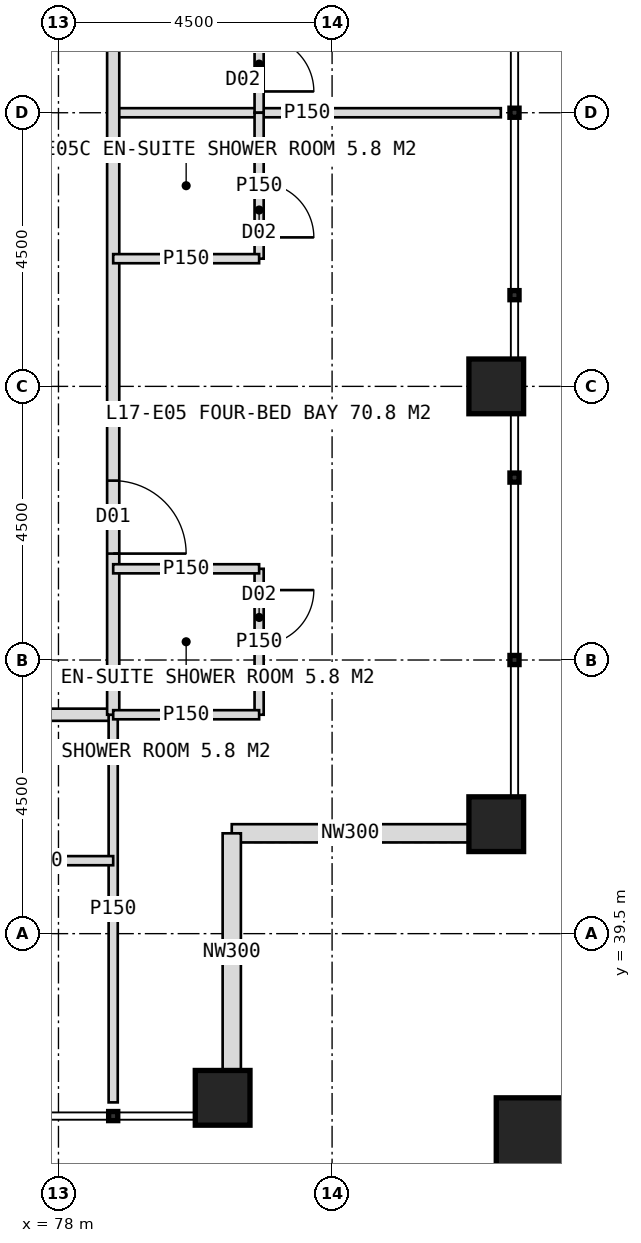
"""IFC4 building model, lengths in metres.
Left out: names, types, materials, properties, quantities, classifications, styles, units other than length and angle.
Written with IfcOpenShell. Run it as: python <this file> out.ifc"""

import sys

from ifc_helpers import new_model, si_unit, direction, frame, frame_2d, origin, origin_2d, place, context, subcontext, project, spatial, rectangle, hollow_rectangle, extrude, element, fill, save


model = new_model("IFC4")
c1 = context("Model", 3, precision=1e-05, world=origin(), true_north=direction((0.0, 1.0)))
c2 = subcontext(c1, "Body", "Model", "MODEL_VIEW")
j1 = project(units=[si_unit("LENGTHUNIT", "METRE"), si_unit("PLANEANGLEUNIT", "RADIAN")], contexts=[c1])
p1 = place(None, origin())
s1 = spatial("IfcSite", under=j1, at=p1, CompositionType="ELEMENT")
p2 = place(p1, origin())
s2 = spatial("IfcBuilding", under=s1, at=p2, CompositionType="ELEMENT")
p3 = place(p2, frame((0.0, 0.0, 75.0)))
s3 = spatial("IfcBuildingStorey", under=s2, at=p3, CompositionType="ELEMENT", Elevation=75.0)
for number, where, z_axis, x_axis in (
    (1, (85.2, 41.3, 0.0), (0.0, 0.0, 1.0), (1.0, 0.0, 0.0)),
    (2, (85.2, 48.5, 0.0), (0.0, 0.0, 1.0), (1.0, 0.0, 0.0)),
    (3, (80.7, 36.8, 0.0), (0.0, 0.0, 1.0), (1.0, 0.0, 0.0)),
):
    element("IfcColumn", number, at=place(p3, frame(where, z_axis=z_axis, x_axis=x_axis)), inside=s3, PredefinedType="COLUMN", context=c2, shape_type="SweptSolid", body=[
        extrude(hollow_rectangle(XDim=0.9, YDim=0.9, WallThickness=0.08, at=origin_2d()), origin(), (0.0, 0.0, 1.0), 4.0),
    ])
p4 = place(p3, frame((86.1, 35.9, 0.0), z_axis=(0.0, 0.0, 1.0), x_axis=(1.0, 0.0, 0.0)))
e4 = element("IfcColumn", 4, at=p4, inside=s3, PredefinedType="COLUMN", context=c2, shape_type="SweptSolid", body=[
    extrude(hollow_rectangle(XDim=1.8, YDim=1.8, WallThickness=0.1, at=origin_2d()), origin(), (0.0, 0.0, 1.0), 4.0),
])
for number, where, z_axis, x_axis in (
    (5, (84.75, 41.15, 0.0), (0.0, 0.0, 1.0), (-1.0, 0.0, 0.0)),
    (6, (80.85, 41.15, 0.0), (0.0, 0.0, 1.0), (0.0, -1.0, 0.0)),
):
    element("IfcWall", number, at=place(p3, frame(where, z_axis=z_axis, x_axis=x_axis)), inside=s3, PredefinedType="ELEMENTEDWALL", context=c2, shape_type="SweptSolid", body=[
        extrude(rectangle(XDim=3.9, YDim=0.3, at=frame_2d((1.95, 0.0))), origin(), (0.0, 0.0, 1.0), 2.95),
    ])
p5 = place(p3, frame((78.9, 43.1, 0.0), z_axis=(0.0, 0.0, 1.0), x_axis=(-1.0, 0.0, 0.0)))
e7 = element("IfcWall", 7, at=p5, inside=s3, PredefinedType="PARTITIONING", context=c2, shape_type="SweptSolid", body=[
    extrude(rectangle(XDim=37.8, YDim=0.2, at=frame_2d((18.9, 0.0))), origin(), (0.0, 0.0, 1.0), 3.75),
])
p6 = place(p5, frame((6.05, 0.0, 0.0)))
e8 = element("IfcOpeningElement", 8, at=p6, cuts=e7, PredefinedType="OPENING", context=c2, shape_type="SweptSolid", body=[
    extrude(rectangle(XDim=1.2, YDim=2.2, at=frame_2d((0.6, 1.1))), frame((0.0, 0.11, 0.0), z_axis=(0.0, -1.0, 0.0), x_axis=(1.0, 0.0, 0.0)), (0.0, 0.0, 1.0), 0.22),
])
p7 = place(p5, frame((12.55, 0.0, 0.0)))
e9 = element("IfcOpeningElement", 9, at=p7, cuts=e7, PredefinedType="OPENING", context=c2, shape_type="SweptSolid", body=[
    extrude(rectangle(XDim=1.2, YDim=2.2, at=frame_2d((0.6, 1.1))), frame((0.0, 0.11, 0.0), z_axis=(0.0, -1.0, 0.0), x_axis=(1.0, 0.0, 0.0)), (0.0, 0.0, 1.0), 0.22),
])
p8 = place(p5, frame((21.05, 0.0, 0.0)))
e10 = element("IfcOpeningElement", 10, at=p8, cuts=e7, PredefinedType="OPENING", context=c2, shape_type="SweptSolid", body=[
    extrude(rectangle(XDim=1.2, YDim=2.2, at=frame_2d((0.6, 1.1))), frame((0.0, 0.11, 0.0), z_axis=(0.0, -1.0, 0.0), x_axis=(1.0, 0.0, 0.0)), (0.0, 0.0, 1.0), 0.22),
])
p9 = place(p5, frame((27.55, 0.0, 0.0)))
e11 = element("IfcOpeningElement", 11, at=p9, cuts=e7, PredefinedType="OPENING", context=c2, shape_type="SweptSolid", body=[
    extrude(rectangle(XDim=1.2, YDim=2.2, at=frame_2d((0.6, 1.1))), frame((0.0, 0.11, 0.0), z_axis=(0.0, -1.0, 0.0), x_axis=(1.0, 0.0, 0.0)), (0.0, 0.0, 1.0), 0.22),
])
p10 = place(p3, frame((78.9, 43.1, 0.0), z_axis=(0.0, 0.0, 1.0), x_axis=(0.0, -1.0, 0.0)))
e12 = element("IfcWall", 12, at=p10, inside=s3, PredefinedType="PARTITIONING", context=c2, shape_type="SweptSolid", body=[
    extrude(rectangle(XDim=6.375, YDim=0.15, at=frame_2d((3.188, 0.0))), origin(), (0.0, 0.0, 1.0), 3.75),
])
p11 = place(p3, frame((78.9, 40.7, 0.0), z_axis=(0.0, 0.0, 1.0), x_axis=(-1.0, 0.0, 0.0)))
e13 = element("IfcWall", 13, at=p11, inside=s3, PredefinedType="PARTITIONING", context=c2, shape_type="SweptSolid", body=[
    extrude(rectangle(XDim=2.4, YDim=0.15, at=frame_2d((1.2, 0.0))), origin(), (0.0, 0.0, 1.0), 3.75),
])
p12 = place(p11, frame((1.15, 0.0, 0.0)))
e14 = element("IfcOpeningElement", 14, at=p12, cuts=e13, PredefinedType="OPENING", context=c2, shape_type="SweptSolid", body=[
    extrude(rectangle(XDim=0.9, YDim=2.1, at=frame_2d((0.45, 1.05))), frame((0.0, 0.085, 0.0), z_axis=(0.0, -1.0, 0.0), x_axis=(1.0, 0.0, 0.0)), (0.0, 0.0, 1.0), 0.17),
])
p13 = place(p3, frame((78.9, 53.0, 0.0), z_axis=(0.0, 0.0, 1.0), x_axis=(1.0, 0.0, 0.0)))
e15 = element("IfcWall", 15, at=p13, inside=s3, PredefinedType="PARTITIONING", context=c2, shape_type="SweptSolid", body=[
    extrude(rectangle(XDim=6.375, YDim=0.15, at=frame_2d((3.188, 0.0))), origin(), (0.0, 0.0, 1.0), 3.75),
])
p14 = place(p3, frame((78.9, 80.9, 0.0), z_axis=(0.0, 0.0, 1.0), x_axis=(0.0, -1.0, 0.0)))
e16 = element("IfcWall", 16, at=p14, inside=s3, PredefinedType="PARTITIONING", context=c2, shape_type="SweptSolid", body=[
    extrude(rectangle(XDim=37.8, YDim=0.2, at=frame_2d((18.9, 0.0))), origin(), (0.0, 0.0, 1.0), 3.75),
])
p15 = place(p14, frame((2.45, 0.0, 0.0)))
e17 = element("IfcOpeningElement", 17, at=p15, cuts=e16, PredefinedType="OPENING", context=c2, shape_type="SweptSolid", body=[
    extrude(rectangle(XDim=1.2, YDim=2.2, at=frame_2d((0.6, 1.1))), frame((0.0, 0.11, 0.0), z_axis=(0.0, -1.0, 0.0), x_axis=(1.0, 0.0, 0.0)), (0.0, 0.0, 1.0), 0.22),
])
p16 = place(p14, frame((9.55, 0.0, 0.0)))
e18 = element("IfcOpeningElement", 18, at=p16, cuts=e16, PredefinedType="OPENING", context=c2, shape_type="SweptSolid", body=[
    extrude(rectangle(XDim=1.2, YDim=2.2, at=frame_2d((0.6, 1.1))), frame((0.0, 0.11, 0.0), z_axis=(0.0, -1.0, 0.0), x_axis=(1.0, 0.0, 0.0)), (0.0, 0.0, 1.0), 0.22),
])
p17 = place(p14, frame((15.05, 0.0, 0.0)))
e19 = element("IfcOpeningElement", 19, at=p17, cuts=e16, PredefinedType="OPENING", context=c2, shape_type="SweptSolid", body=[
    extrude(rectangle(XDim=1.2, YDim=2.2, at=frame_2d((0.6, 1.1))), frame((0.0, 0.11, 0.0), z_axis=(0.0, -1.0, 0.0), x_axis=(1.0, 0.0, 0.0)), (0.0, 0.0, 1.0), 0.22),
])
p18 = place(p14, frame((21.55, 0.0, 0.0)))
e20 = element("IfcOpeningElement", 20, at=p18, cuts=e16, PredefinedType="OPENING", context=c2, shape_type="SweptSolid", body=[
    extrude(rectangle(XDim=1.2, YDim=2.2, at=frame_2d((0.6, 1.1))), frame((0.0, 0.11, 0.0), z_axis=(0.0, -1.0, 0.0), x_axis=(1.0, 0.0, 0.0)), (0.0, 0.0, 1.0), 0.22),
])
p19 = place(p14, frame((33.95, 0.0, 0.0)))
e21 = element("IfcOpeningElement", 21, at=p19, cuts=e16, PredefinedType="OPENING", context=c2, shape_type="SweptSolid", body=[
    extrude(rectangle(XDim=1.2, YDim=2.2, at=frame_2d((0.6, 1.1))), frame((0.0, 0.11, 0.0), z_axis=(0.0, -1.0, 0.0), x_axis=(1.0, 0.0, 0.0)), (0.0, 0.0, 1.0), 0.22),
])
p20 = place(p3, frame((81.3, 55.4, 0.0), z_axis=(0.0, 0.0, 1.0), x_axis=(0.0, -1.0, 0.0)))
e22 = element("IfcWall", 22, at=p20, inside=s3, PredefinedType="PARTITIONING", context=c2, shape_type="SweptSolid", body=[
    extrude(rectangle(XDim=2.4, YDim=0.15, at=frame_2d((1.2, 0.0))), origin(), (0.0, 0.0, 1.0), 3.75),
])
p21 = place(p20, frame((1.15, 0.0, 0.0)))
e23 = element("IfcOpeningElement", 23, at=p21, cuts=e22, PredefinedType="OPENING", context=c2, shape_type="SweptSolid", body=[
    extrude(rectangle(XDim=0.9, YDim=2.1, at=frame_2d((0.45, 1.05))), frame((0.0, 0.085, 0.0), z_axis=(0.0, -1.0, 0.0), x_axis=(1.0, 0.0, 0.0)), (0.0, 0.0, 1.0), 0.17),
])
p22 = place(p3, frame((81.3, 45.5, 0.0), z_axis=(0.0, 0.0, 1.0), x_axis=(0.0, -1.0, 0.0)))
e24 = element("IfcWall", 24, at=p22, inside=s3, PredefinedType="PARTITIONING", context=c2, shape_type="SweptSolid", body=[
    extrude(rectangle(XDim=2.4, YDim=0.15, at=frame_2d((1.2, 0.0))), origin(), (0.0, 0.0, 1.0), 3.75),
])
p23 = place(p22, frame((0.35, 0.0, 0.0)))
e25 = element("IfcOpeningElement", 25, at=p23, cuts=e24, PredefinedType="OPENING", context=c2, shape_type="SweptSolid", body=[
    extrude(rectangle(XDim=0.9, YDim=2.1, at=frame_2d((0.45, 1.05))), frame((0.0, 0.085, 0.0), z_axis=(0.0, -1.0, 0.0), x_axis=(1.0, 0.0, 0.0)), (0.0, 0.0, 1.0), 0.17),
])
p24 = place(p3, frame((78.9, 45.5, 0.0), z_axis=(0.0, 0.0, 1.0), x_axis=(1.0, 0.0, 0.0)))
e26 = element("IfcWall", 26, at=p24, inside=s3, PredefinedType="PARTITIONING", context=c2, shape_type="SweptSolid", body=[
    extrude(rectangle(XDim=2.4, YDim=0.15, at=frame_2d((1.2, 0.0))), origin(), (0.0, 0.0, 1.0), 3.75),
])
p25 = place(p3, frame((81.3, 53.0, 0.0), z_axis=(0.0, 0.0, 1.0), x_axis=(0.0, -1.0, 0.0)))
e27 = element("IfcWall", 27, at=p25, inside=s3, PredefinedType="PARTITIONING", context=c2, shape_type="SweptSolid", body=[
    extrude(rectangle(XDim=2.4, YDim=0.15, at=frame_2d((1.2, 0.0))), origin(), (0.0, 0.0, 1.0), 3.75),
])
p26 = place(p25, frame((1.15, 0.0, 0.0)))
e28 = element("IfcOpeningElement", 28, at=p26, cuts=e27, PredefinedType="OPENING", context=c2, shape_type="SweptSolid", body=[
    extrude(rectangle(XDim=0.9, YDim=2.1, at=frame_2d((0.45, 1.05))), frame((0.0, 0.085, 0.0), z_axis=(0.0, -1.0, 0.0), x_axis=(1.0, 0.0, 0.0)), (0.0, 0.0, 1.0), 0.17),
])
for number, where, z_axis, x_axis in (
    (29, (78.9, 50.6, 0.0), (0.0, 0.0, 1.0), (1.0, 0.0, 0.0)),
    (30, (78.9, 43.1, 0.0), (0.0, 0.0, 1.0), (1.0, 0.0, 0.0)),
):
    element("IfcWall", number, at=place(p3, frame(where, z_axis=z_axis, x_axis=x_axis)), inside=s3, PredefinedType="PARTITIONING", context=c2, shape_type="SweptSolid", body=[
        extrude(rectangle(XDim=2.4, YDim=0.15, at=frame_2d((1.2, 0.0))), origin(), (0.0, 0.0, 1.0), 3.75),
    ])
p27 = place(p21, origin())
e31 = element("IfcDoor", 31, at=p27, inside=s3, OperationType="SINGLE_SWING_RIGHT", PredefinedType="DOOR", context=c2, shape_type="SweptSolid", body=[
    extrude(rectangle(XDim=0.9, YDim=2.1, at=frame_2d((0.45, 1.05))), frame((0.0, 0.025, 0.0), z_axis=(0.0, -1.0, 0.0), x_axis=(1.0, 0.0, 0.0)), (0.0, 0.0, 1.0), 0.05),
])
fill(e23, e31)
p28 = place(p19, origin())
e32 = element("IfcDoor", 32, at=p28, inside=s3, OperationType="SINGLE_SWING_RIGHT", PredefinedType="DOOR", context=c2, shape_type="SweptSolid", body=[
    extrude(rectangle(XDim=1.2, YDim=2.2, at=frame_2d((0.6, 1.1))), frame((0.0, 0.025, 0.0), z_axis=(0.0, -1.0, 0.0), x_axis=(1.0, 0.0, 0.0)), (0.0, 0.0, 1.0), 0.05),
])
fill(e21, e32)
p29 = place(p23, origin())
e33 = element("IfcDoor", 33, at=p29, inside=s3, OperationType="SINGLE_SWING_LEFT", PredefinedType="DOOR", context=c2, shape_type="SweptSolid", body=[
    extrude(rectangle(XDim=0.9, YDim=2.1, at=frame_2d((0.45, 1.05))), frame((0.0, 0.025, 0.0), z_axis=(0.0, -1.0, 0.0), x_axis=(1.0, 0.0, 0.0)), (0.0, 0.0, 1.0), 0.05),
])
fill(e25, e33)
p30 = place(p26, origin())
e34 = element("IfcDoor", 34, at=p30, inside=s3, OperationType="SINGLE_SWING_RIGHT", PredefinedType="DOOR", context=c2, shape_type="SweptSolid", body=[
    extrude(rectangle(XDim=0.9, YDim=2.1, at=frame_2d((0.45, 1.05))), frame((0.0, 0.025, 0.0), z_axis=(0.0, -1.0, 0.0), x_axis=(1.0, 0.0, 0.0)), (0.0, 0.0, 1.0), 0.05),
])
fill(e28, e34)
save(model, sys.argv[1])
